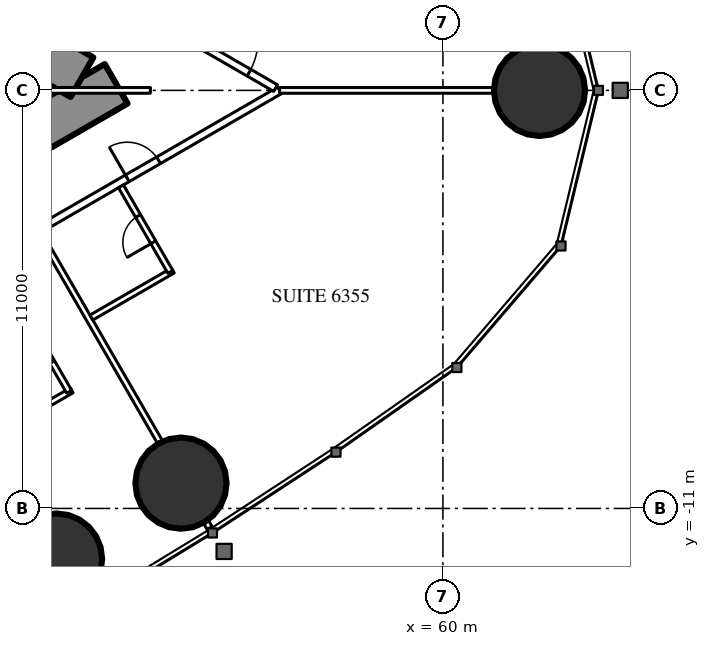
"""IFC4 building model, lengths in metres.
Left out: names, types, materials, properties, quantities, classifications, styles, units other than length and angle.
Written with IfcOpenShell. Run it as: python <this file> out.ifc"""

import sys

from ifc_helpers import new_model, si_unit, direction, frame, frame_2d, origin, origin_2d, place, context, subcontext, project, spatial, rectangle, circle, extrude, element, fill, save


model = new_model("IFC4")
c1 = context("Model", 3, precision=1e-05, world=origin(), true_north=direction((0.0, 1.0)))
c2 = subcontext(c1, "Body", "Model", "MODEL_VIEW")
j1 = project(units=[si_unit("LENGTHUNIT", "METRE"), si_unit("PLANEANGLEUNIT", "RADIAN")], contexts=[c1])
p1 = place(None, origin())
s1 = spatial("IfcSite", under=j1, at=p1, CompositionType="ELEMENT")
p2 = place(p1, origin())
s2 = spatial("IfcBuilding", under=s1, at=p2, CompositionType="ELEMENT")
p3 = place(p2, frame((0.0, 0.0, 236.9)))
s3 = spatial("IfcBuildingStorey", under=s2, at=p3, CompositionType="ELEMENT", Elevation=236.9)
for number, where, z_axis, x_axis in (
    (1, (62.542, 0.0, 0.0), (0.0, 0.0, 1.0), (1.0, 0.0, 0.0)),
    (2, (49.834, -12.332, 0.0), (0.0, 0.0, 1.0), (1.0, 0.0, 0.0)),
    (3, (53.108, -10.334, 0.0), (0.0, 0.0, 1.0), (1.0, 0.0, 0.0)),
):
    element("IfcColumn", number, at=place(p3, frame(where, z_axis=z_axis, x_axis=x_axis)), inside=s3, PredefinedType="COLUMN", context=c2, shape_type="SweptSolid", body=[
        extrude(circle(Radius=1.2, at=origin_2d()), origin(), (0.0, 0.0, 1.0), 3.6),
    ])
p4 = place(p3, frame((27.2, -13.8, 0.0), z_axis=(0.0, 0.0, 1.0), x_axis=(0.866027159892, 0.499996958321, 0.0)))
e4 = element("IfcWall", 4, at=p4, inside=s3, PredefinedType="SHEAR", context=c2, shape_type="SweptSolid", body=[
    extrude(rectangle(XDim=27.947, YDim=1.2, at=frame_2d((13.973, 0.0))), origin(), (0.0, 0.0, 1.0), 3.6),
])
p5 = place(p4, frame((4.6, 0.0, 0.0)))
e5 = element("IfcOpeningElement", 5, at=p5, cuts=e4, PredefinedType="OPENING", context=c2, shape_type="SweptSolid", body=[
    extrude(rectangle(XDim=1.0, YDim=2.2, at=frame_2d((0.5, 1.1))), frame((0.0, 0.61, 0.0), z_axis=(0.0, -1.0, 0.0), x_axis=(1.0, 0.0, 0.0)), (0.0, 0.0, 1.0), 1.22),
])
p6 = place(p4, frame((13.395, 0.0, 0.0)))
e6 = element("IfcOpeningElement", 6, at=p6, cuts=e4, PredefinedType="OPENING", context=c2, shape_type="SweptSolid", body=[
    extrude(rectangle(XDim=1.8, YDim=2.2, at=frame_2d((0.9, 1.1))), frame((0.0, 0.61, 0.0), z_axis=(0.0, -1.0, 0.0), x_axis=(1.0, 0.0, 0.0)), (0.0, 0.0, 1.0), 1.22),
])
p7 = place(p3, frame((27.2, 13.8, 0.0), z_axis=(0.0, 0.0, 1.0), x_axis=(0.866024515034, -0.500001539357, 0.0)))
e7 = element("IfcWall", 7, at=p7, inside=s3, PredefinedType="SHEAR", context=c2, shape_type="SweptSolid", body=[
    extrude(rectangle(XDim=26.907, YDim=1.2, at=frame_2d((13.454, 0.0))), origin(), (0.0, 0.0, 1.0), 3.6),
])
p8 = place(p7, frame((4.6, 0.0, 0.0)))
e8 = element("IfcOpeningElement", 8, at=p8, cuts=e7, PredefinedType="OPENING", context=c2, shape_type="SweptSolid", body=[
    extrude(rectangle(XDim=1.0, YDim=2.2, at=frame_2d((0.5, 1.1))), frame((0.0, 0.61, 0.0), z_axis=(0.0, -1.0, 0.0), x_axis=(1.0, 0.0, 0.0)), (0.0, 0.0, 1.0), 1.22),
])
p9 = place(p7, frame((13.395, 0.0, 0.0)))
e9 = element("IfcOpeningElement", 9, at=p9, cuts=e7, PredefinedType="OPENING", context=c2, shape_type="SweptSolid", body=[
    extrude(rectangle(XDim=1.8, YDim=2.2, at=frame_2d((0.9, 1.1))), frame((0.0, 0.61, 0.0), z_axis=(0.0, -1.0, 0.0), x_axis=(1.0, 0.0, 0.0)), (0.0, 0.0, 1.0), 1.22),
])
p10 = place(p3, frame((28.959, -15.44, 0.0), z_axis=(0.0, 0.0, 1.0), x_axis=(0.866025227435, 0.500000305447, 0.0)))
e10 = element("IfcWall", 10, at=p10, inside=s3, PredefinedType="PARTITIONING", context=c2, shape_type="SweptSolid", body=[
    extrude(rectangle(XDim=30.88, YDim=0.2, at=frame_2d((15.44, 0.0))), origin(), (0.0, 0.0, 1.0), 3.35),
])
p11 = place(p10, frame((1.494, 0.0, 0.0)))
e11 = element("IfcOpeningElement", 11, at=p11, cuts=e10, PredefinedType="OPENING", context=c2, shape_type="SweptSolid", body=[
    extrude(rectangle(XDim=1.8, YDim=2.03, at=frame_2d((0.9, 1.015))), frame((0.0, 0.11, 0.0), z_axis=(0.0, -1.0, 0.0), x_axis=(1.0, 0.0, 0.0)), (0.0, 0.0, 1.0), 0.22),
])
p12 = place(p10, frame((7.687, 0.0, 0.0)))
e12 = element("IfcOpeningElement", 12, at=p12, cuts=e10, PredefinedType="OPENING", context=c2, shape_type="SweptSolid", body=[
    extrude(rectangle(XDim=1.0, YDim=2.2, at=frame_2d((0.5, 1.1))), frame((0.0, 0.11, 0.0), z_axis=(0.0, -1.0, 0.0), x_axis=(1.0, 0.0, 0.0)), (0.0, 0.0, 1.0), 0.22),
])
p13 = place(p10, frame((16.137, 0.0, 0.0)))
e13 = element("IfcOpeningElement", 13, at=p13, cuts=e10, PredefinedType="OPENING", context=c2, shape_type="SweptSolid", body=[
    extrude(rectangle(XDim=0.95, YDim=2.2, at=frame_2d((0.475, 1.1))), frame((0.0, 0.11, 0.0), z_axis=(0.0, -1.0, 0.0), x_axis=(1.0, 0.0, 0.0)), (0.0, 0.0, 1.0), 0.22),
])
p14 = place(p10, frame((20.021, 0.0, 0.0)))
e14 = element("IfcOpeningElement", 14, at=p14, cuts=e10, PredefinedType="OPENING", context=c2, shape_type="SweptSolid", body=[
    extrude(rectangle(XDim=0.95, YDim=2.2, at=frame_2d((0.475, 1.1))), frame((0.0, 0.11, 0.0), z_axis=(0.0, -1.0, 0.0), x_axis=(1.0, 0.0, 0.0)), (0.0, 0.0, 1.0), 0.22),
])
p15 = place(p10, frame((26.253, 0.0, 0.0)))
e15 = element("IfcOpeningElement", 15, at=p15, cuts=e10, PredefinedType="OPENING", context=c2, shape_type="SweptSolid", body=[
    extrude(rectangle(XDim=0.95, YDim=2.2, at=frame_2d((0.475, 1.1))), frame((0.0, 0.11, 0.0), z_axis=(0.0, -1.0, 0.0), x_axis=(1.0, 0.0, 0.0)), (0.0, 0.0, 1.0), 0.22),
])
p16 = place(p3, frame((49.385, -3.763, 0.0), z_axis=(0.0, 0.0, 1.0), x_axis=(0.499999447814, -0.866025722589, 0.0)))
e16 = element("IfcWall", 16, at=p16, inside=s3, PredefinedType="PARTITIONING", context=c2, shape_type="SweptSolid", body=[
    extrude(rectangle(XDim=6.333, YDim=0.15, at=frame_2d((3.166, 0.0))), origin(), (0.0, 0.0, 1.0), 2.45),
])
p17 = place(p3, frame((53.771, -11.36, 0.0), z_axis=(0.0, 0.0, 1.0), x_axis=(0.499524978789, -0.866299483762, 0.0)))
e17 = element("IfcWall", 17, at=p17, inside=s3, PredefinedType="PARTITIONING", context=c2, shape_type="SweptSolid", body=[
    extrude(rectangle(XDim=0.178, YDim=0.15, at=frame_2d((0.089, 0.0))), origin(), (0.0, 0.0, 1.0), 2.45),
])
p18 = place(p3, frame((55.702, 0.0, 0.0), z_axis=(0.0, 0.0, 1.0), x_axis=(1.0, 0.0, 0.0)))
e18 = element("IfcWall", 18, at=p18, inside=s3, PredefinedType="PARTITIONING", context=c2, shape_type="SweptSolid", body=[
    extrude(rectangle(XDim=5.619, YDim=0.15, at=frame_2d((2.81, 0.0))), origin(), (0.0, 0.0, 1.0), 2.45),
])
p19 = place(p3, frame((52.639, 1.769, 0.0), z_axis=(0.0, 0.0, 1.0), x_axis=(0.866027340901, -0.4999966448, 0.0)))
e19 = element("IfcWall", 19, at=p19, inside=s3, PredefinedType="PARTITIONING", context=c2, shape_type="SweptSolid", body=[
    extrude(rectangle(XDim=3.417, YDim=0.2, at=frame_2d((1.708, 0.0))), origin(), (0.0, 0.0, 1.0), 3.35),
])
p20 = place(p19, frame((0.809, 0.0, 0.0)))
e20 = element("IfcOpeningElement", 20, at=p20, cuts=e19, PredefinedType="OPENING", context=c2, shape_type="SweptSolid", body=[
    extrude(rectangle(XDim=1.8, YDim=2.2, at=frame_2d((0.9, 1.1))), frame((0.0, 0.11, 0.0), z_axis=(0.0, -1.0, 0.0), x_axis=(1.0, 0.0, 0.0)), (0.0, 0.0, 1.0), 0.22),
])
p21 = place(p3, frame((48.088, -9.13, 0.0), z_axis=(0.0, 0.0, 1.0), x_axis=(0.86604923931, 0.499958713387, 0.0)))
e21 = element("IfcWall", 21, at=p21, inside=s3, PredefinedType="PARTITIONING", context=c2, shape_type="SweptSolid", body=[
    extrude(rectangle(XDim=2.475, YDim=0.15, at=frame_2d((1.237, 0.0))), origin(), (0.0, 0.0, 1.0), 3.35),
])
p22 = place(p3, frame((48.866, -5.679, 0.0), z_axis=(0.0, 0.0, 1.0), x_axis=(0.500006934395, -0.866021400173, 0.0)))
e22 = element("IfcWall", 22, at=p22, inside=s3, PredefinedType="PARTITIONING", context=c2, shape_type="SweptSolid", body=[
    extrude(rectangle(XDim=2.6, YDim=0.15, at=frame_2d((1.3, 0.0))), origin(), (0.0, 0.0, 1.0), 3.35),
])
p23 = place(p22, frame((0.9, 0.0, 0.0)))
e23 = element("IfcOpeningElement", 23, at=p23, cuts=e22, PredefinedType="OPENING", context=c2, shape_type="SweptSolid", body=[
    extrude(rectangle(XDim=0.8, YDim=2.2, at=frame_2d((0.4, 1.1))), frame((0.0, 0.085, 0.0), z_axis=(0.0, -1.0, 0.0), x_axis=(1.0, 0.0, 0.0)), (0.0, 0.0, 1.0), 0.17),
])
p24 = place(p3, frame((50.75, -5.977, 0.0), z_axis=(0.0, 0.0, 1.0), x_axis=(0.866031185235, 0.4999899861, 0.0)))
e24 = element("IfcWall", 24, at=p24, inside=s3, PredefinedType="PARTITIONING", context=c2, shape_type="SweptSolid", body=[
    extrude(rectangle(XDim=2.475, YDim=0.15, at=frame_2d((1.238, 0.0))), origin(), (0.0, 0.0, 1.0), 3.35),
])
p25 = place(p3, frame((51.529, -2.525, 0.0), z_axis=(0.0, 0.0, 1.0), x_axis=(0.500006934395, -0.866021400173, 0.0)))
e25 = element("IfcWall", 25, at=p25, inside=s3, PredefinedType="PARTITIONING", context=c2, shape_type="SweptSolid", body=[
    extrude(rectangle(XDim=2.6, YDim=0.15, at=frame_2d((1.3, 0.0))), origin(), (0.0, 0.0, 1.0), 3.35),
])
p26 = place(p25, frame((0.9, 0.0, 0.0)))
e26 = element("IfcOpeningElement", 26, at=p26, cuts=e25, PredefinedType="OPENING", context=c2, shape_type="SweptSolid", body=[
    extrude(rectangle(XDim=0.8, YDim=2.2, at=frame_2d((0.4, 1.1))), frame((0.0, 0.085, 0.0), z_axis=(0.0, -1.0, 0.0), x_axis=(1.0, 0.0, 0.0)), (0.0, 0.0, 1.0), 0.17),
])
p27 = place(p3, frame((43.075, 0.0, 0.0), z_axis=(0.0, 0.0, 1.0), x_axis=(1.0, 0.0, 0.0)))
e27 = element("IfcWall", 27, at=p27, inside=s3, PredefinedType="PARTITIONING", context=c2, shape_type="SweptSolid", body=[
    extrude(rectangle(XDim=9.227, YDim=0.15, at=frame_2d((4.614, 0.0))), origin(), (0.0, 0.0, 1.0), 2.45),
])
p28 = place(p23, origin())
e28 = element("IfcDoor", 28, at=p28, inside=s3, OperationType="SINGLE_SWING_RIGHT", PredefinedType="DOOR", context=c2, shape_type="SweptSolid", body=[
    extrude(rectangle(XDim=0.8, YDim=2.2, at=frame_2d((0.4, 1.1))), frame((0.0, 0.025, 0.0), z_axis=(0.0, -1.0, 0.0), x_axis=(1.0, 0.0, 0.0)), (0.0, 0.0, 1.0), 0.05),
])
fill(e23, e28)
p29 = place(p26, origin())
e29 = element("IfcDoor", 29, at=p29, inside=s3, OperationType="SINGLE_SWING_RIGHT", PredefinedType="DOOR", context=c2, shape_type="SweptSolid", body=[
    extrude(rectangle(XDim=0.8, YDim=2.2, at=frame_2d((0.4, 1.1))), frame((0.0, 0.025, 0.0), z_axis=(0.0, -1.0, 0.0), x_axis=(1.0, 0.0, 0.0)), (0.0, 0.0, 1.0), 0.05),
])
fill(e26, e29)
p30 = place(p15, origin())
e30 = element("IfcDoor", 30, at=p30, inside=s3, OperationType="SINGLE_SWING_LEFT", PredefinedType="DOOR", context=c2, shape_type="SweptSolid", body=[
    extrude(rectangle(XDim=0.95, YDim=2.2, at=frame_2d((0.475, 1.1))), frame((0.0, 0.025, 0.0), z_axis=(0.0, -1.0, 0.0), x_axis=(1.0, 0.0, 0.0)), (0.0, 0.0, 1.0), 0.05),
])
fill(e15, e30)
p31 = place(p20, origin())
e31 = element("IfcDoor", 31, at=p31, inside=s3, OperationType="DOUBLE_DOOR_SINGLE_SWING", PredefinedType="DOOR", context=c2, shape_type="SweptSolid", body=[
    extrude(rectangle(XDim=1.8, YDim=2.2, at=frame_2d((0.9, 1.1))), frame((0.0, 0.025, 0.0), z_axis=(0.0, -1.0, 0.0), x_axis=(1.0, 0.0, 0.0)), (0.0, 0.0, 1.0), 0.05),
])
fill(e20, e31)
save(model, sys.argv[1])
